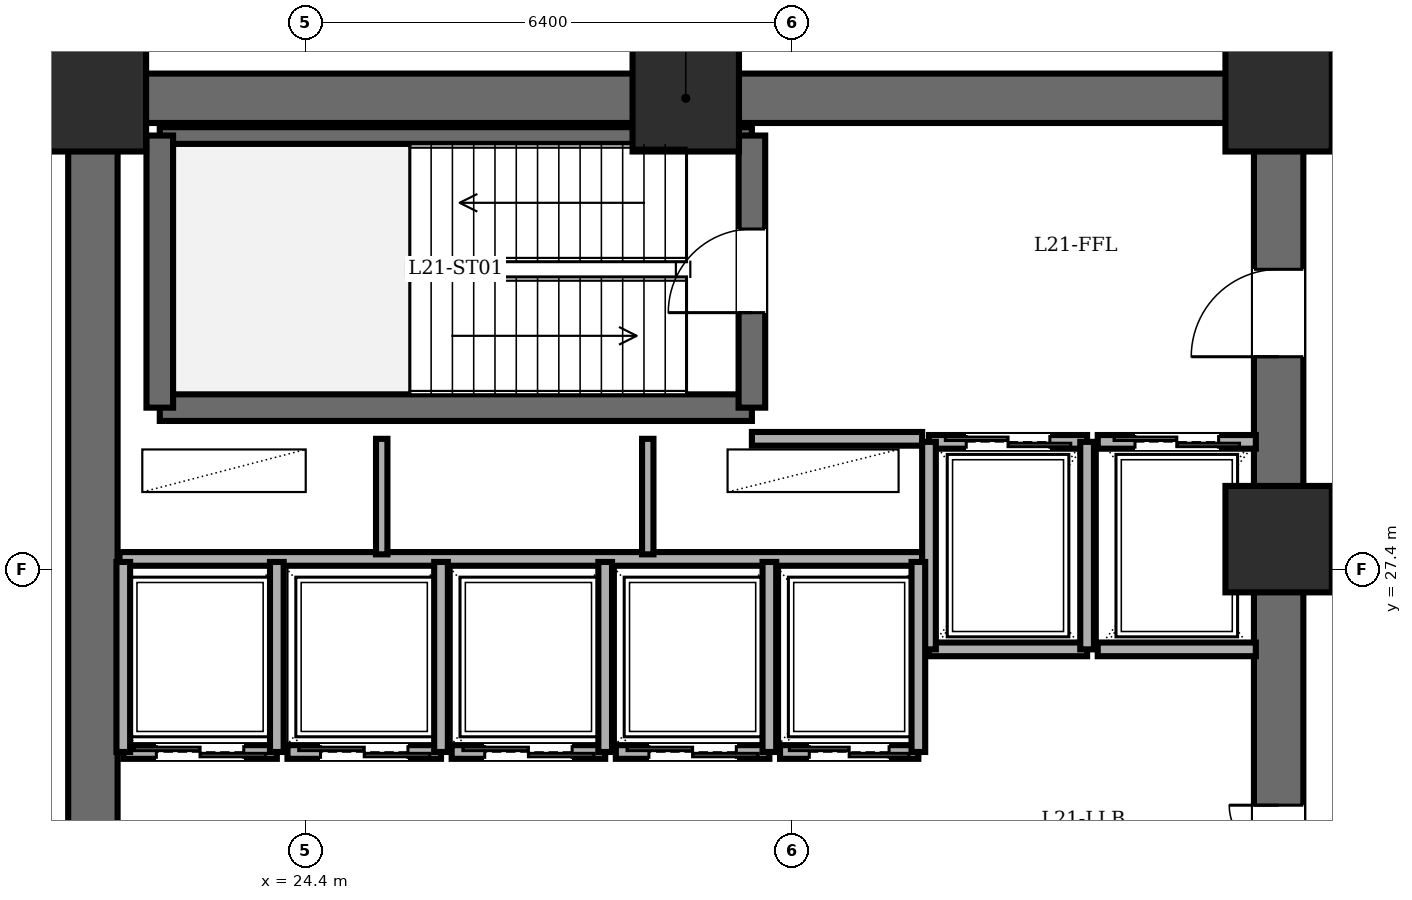
"""IFC4 building model, lengths in metres.
Left out: names, types, materials, properties, quantities, classifications, styles, units other than length and angle.
Written with IfcOpenShell. Run it as: python <this file> out.ifc"""

import sys

from ifc_helpers import new_model, si_unit, direction, frame, frame_2d, origin, origin_2d, place, context, subcontext, project, spatial, rectangle, extrude, element, fill, save


model = new_model("IFC4")
c1 = context("Model", 3, precision=1e-05, world=origin(), true_north=direction((0.0, 1.0)))
c2 = subcontext(c1, "Body", "Model", "MODEL_VIEW")
j1 = project(units=[si_unit("LENGTHUNIT", "METRE"), si_unit("PLANEANGLEUNIT", "RADIAN")], contexts=[c1])
p1 = place(None, origin())
s1 = spatial("IfcSite", under=j1, at=p1, CompositionType="ELEMENT")
p2 = place(p1, origin())
s2 = spatial("IfcBuilding", under=s1, at=p2, CompositionType="ELEMENT")
p3 = place(p2, frame((0.0, 0.0, 81.2)))
s3 = spatial("IfcBuildingStorey", under=s2, at=p3, CompositionType="ELEMENT", Elevation=81.2)
for number, where, z_axis, x_axis in (
    (1, (37.2, 27.8, 0.0), (0.0, 0.0, 1.0), (1.0, 0.0, 0.0)),
    (2, (37.2, 33.6, 0.0), (0.0, 0.0, 1.0), (1.0, 0.0, 0.0)),
    (3, (29.4, 33.6, 0.0), (0.0, 0.0, 1.0), (1.0, 0.0, 0.0)),
    (4, (21.6, 33.6, 0.0), (0.0, 0.0, 1.0), (1.0, 0.0, 0.0)),
):
    element("IfcColumn", number, at=place(p3, frame(where, z_axis=z_axis, x_axis=x_axis)), inside=s3, PredefinedType="COLUMN", context=c2, shape_type="SweptSolid", body=[
        extrude(rectangle(XDim=1.4, YDim=1.4, at=origin_2d()), origin(), (0.0, 0.0, 1.0), 5.1),
    ])
p4 = place(p3, frame((21.6, 14.4, 0.0), z_axis=(0.0, 0.0, 1.0), x_axis=(0.0, 1.0, 0.0)))
e5 = element("IfcWall", 5, at=p4, inside=s3, PredefinedType="SHEAR", context=c2, shape_type="SweptSolid", body=[
    extrude(rectangle(XDim=19.2, YDim=0.65, at=frame_2d((9.6, 0.0))), origin(), (0.0, 0.0, 1.0), 4.9),
])
p5 = place(p3, frame((21.6, 33.6, 0.0), z_axis=(0.0, 0.0, 1.0), x_axis=(1.0, 0.0, 0.0)))
e6 = element("IfcWall", 6, at=p5, inside=s3, PredefinedType="SHEAR", context=c2, shape_type="SweptSolid", body=[
    extrude(rectangle(XDim=15.6, YDim=0.65, at=frame_2d((7.8, 0.0))), origin(), (0.0, 0.0, 1.0), 4.9),
])
p6 = place(p3, frame((37.2, 14.4, 0.0), z_axis=(0.0, 0.0, 1.0), x_axis=(0.0, 1.0, 0.0)))
e7 = element("IfcWall", 7, at=p6, inside=s3, PredefinedType="SHEAR", context=c2, shape_type="SweptSolid", body=[
    extrude(rectangle(XDim=19.2, YDim=0.65, at=frame_2d((9.6, 0.0))), origin(), (0.0, 0.0, 1.0), 4.9),
])
p7 = place(p6, frame((15.8, 0.0, 0.0)))
e8 = element("IfcOpeningElement", 8, at=p7, cuts=e7, PredefinedType="OPENING", context=c2, shape_type="SweptSolid", body=[
    extrude(rectangle(XDim=1.15, YDim=2.15, at=frame_2d((0.575, 1.075))), frame((0.0, 0.335, 0.0), z_axis=(0.0, -1.0, 0.0), x_axis=(1.0, 0.0, 0.0)), (0.0, 0.0, 1.0), 0.67),
])
p8 = place(p6, frame((3.6, 0.0, 0.0)))
e9 = element("IfcOpeningElement", 9, at=p8, cuts=e7, PredefinedType="OPENING", context=c2, shape_type="SweptSolid", body=[
    extrude(rectangle(XDim=1.1, YDim=2.15, at=frame_2d((0.55, 1.075))), frame((0.0, 0.335, 0.0), z_axis=(0.0, -1.0, 0.0), x_axis=(1.0, 0.0, 0.0)), (0.0, 0.0, 1.0), 0.67),
])
p9 = place(p6, frame((8.6, 0.0, 0.0)))
e10 = element("IfcOpeningElement", 10, at=p9, cuts=e7, PredefinedType="OPENING", context=c2, shape_type="SweptSolid", body=[
    extrude(rectangle(XDim=1.3, YDim=2.2, at=frame_2d((0.65, 1.1))), frame((0.0, 0.335, 0.0), z_axis=(0.0, -1.0, 0.0), x_axis=(1.0, 0.0, 0.0)), (0.0, 0.0, 1.0), 0.67),
])
p10 = place(p3, frame((22.48, 29.53, 0.0), z_axis=(0.0, 0.0, 1.0), x_axis=(1.0, 0.0, 0.0)))
e11 = element("IfcWall", 11, at=p10, inside=s3, PredefinedType="SOLIDWALL", context=c2, shape_type="SweptSolid", body=[
    extrude(rectangle(XDim=7.79, YDim=0.35, at=frame_2d((3.895, 0.0))), origin(), (0.0, 0.0, 1.0), 4.9),
])
p11 = place(p3, frame((22.48, 33.11, 0.0), z_axis=(0.0, 0.0, 1.0), x_axis=(1.0, 0.0, 0.0)))
e12 = element("IfcWall", 12, at=p11, inside=s3, PredefinedType="PARTITIONING", context=c2, shape_type="SweptSolid", body=[
    extrude(rectangle(XDim=7.79, YDim=0.22, at=frame_2d((3.895, 0.0))), origin(), (0.0, 0.0, 1.0), 4.9),
])
p12 = place(p3, frame((22.48, 29.53, 0.0), z_axis=(0.0, 0.0, 1.0), x_axis=(0.0, 1.0, 0.0)))
e13 = element("IfcWall", 13, at=p12, inside=s3, PredefinedType="SOLIDWALL", context=c2, shape_type="SweptSolid", body=[
    extrude(rectangle(XDim=3.58, YDim=0.35, at=frame_2d((1.79, 0.0))), origin(), (0.0, 0.0, 1.0), 4.9),
])
p13 = place(p3, frame((30.27, 29.53, 0.0), z_axis=(0.0, 0.0, 1.0), x_axis=(0.0, 1.0, 0.0)))
e14 = element("IfcWall", 14, at=p13, inside=s3, PredefinedType="SOLIDWALL", context=c2, shape_type="SweptSolid", body=[
    extrude(rectangle(XDim=3.58, YDim=0.35, at=frame_2d((1.79, 0.0))), origin(), (0.0, 0.0, 1.0), 4.9),
])
p14 = place(p13, frame((1.25, 0.0, 0.0)))
e15 = element("IfcOpeningElement", 15, at=p14, cuts=e14, PredefinedType="OPENING", context=c2, shape_type="SweptSolid", body=[
    extrude(rectangle(XDim=1.1, YDim=2.15, at=frame_2d((0.55, 1.075))), frame((0.0, 0.185, 0.0), z_axis=(0.0, -1.0, 0.0), x_axis=(1.0, 0.0, 0.0)), (0.0, 0.0, 1.0), 0.37),
])
p15 = place(p3, frame((30.27, 29.12, 0.0), z_axis=(0.0, 0.0, 1.0), x_axis=(1.0, 0.0, 0.0)))
e16 = element("IfcWall", 16, at=p15, inside=s3, PredefinedType="PARTITIONING", context=c2, shape_type="SweptSolid", body=[
    extrude(rectangle(XDim=2.24, YDim=0.18, at=frame_2d((1.12, 0.0))), origin(), (0.0, 0.0, 1.0), 4.9),
])
p16 = place(p3, frame((21.95, 27.54, 0.0), z_axis=(0.0, 0.0, 1.0), x_axis=(1.0, 0.0, 0.0)))
e17 = element("IfcWall", 17, at=p16, inside=s3, PredefinedType="PARTITIONING", context=c2, shape_type="SweptSolid", body=[
    extrude(rectangle(XDim=10.56, YDim=0.18, at=frame_2d((5.28, 0.0))), origin(), (0.0, 0.0, 1.0), 4.9),
])
for number, where, z_axis, x_axis in (
    (18, (25.4, 27.6, 0.0), (0.0, 0.0, 1.0), (0.0, 1.0, 0.0)),
    (19, (28.9, 27.6, 0.0), (0.0, 0.0, 1.0), (0.0, 1.0, 0.0)),
):
    element("IfcWall", number, at=place(p3, frame(where, z_axis=z_axis, x_axis=x_axis)), inside=s3, PredefinedType="PARTITIONING", context=c2, shape_type="SweptSolid", body=[
        extrude(rectangle(XDim=1.52, YDim=0.15, at=frame_2d((0.76, 0.0))), origin(), (0.0, 0.0, 1.0), 4.9),
    ])
p17 = place(p3, frame((32.6, 29.08, 0.0), z_axis=(0.0, 0.0, 1.0), x_axis=(1.0, 0.0, 0.0)))
e20 = element("IfcWall", 20, at=p17, inside=s3, PredefinedType="PARTITIONING", context=c2, shape_type="SweptSolid", body=[
    extrude(rectangle(XDim=2.08, YDim=0.18, at=frame_2d((1.04, 0.0))), origin(), (0.0, 0.0, 1.0), 4.9),
])
p18 = place(p17, frame((0.49, 0.0, 0.0)))
e21 = element("IfcOpeningElement", 21, at=p18, cuts=e20, PredefinedType="OPENING", context=c2, shape_type="SweptSolid", body=[
    extrude(rectangle(XDim=1.1, YDim=2.2, at=frame_2d((0.55, 1.1))), frame((0.0, 0.1, 0.0), z_axis=(0.0, -1.0, 0.0), x_axis=(1.0, 0.0, 0.0)), (0.0, 0.0, 1.0), 0.2),
])
p19 = place(p3, frame((34.68, 26.35, 0.0), z_axis=(0.0, 0.0, 1.0), x_axis=(-1.0, 0.0, 0.0)))
e22 = element("IfcWall", 22, at=p19, inside=s3, PredefinedType="PARTITIONING", context=c2, shape_type="SweptSolid", body=[
    extrude(rectangle(XDim=2.08, YDim=0.18, at=frame_2d((1.04, 0.0))), origin(), (0.0, 0.0, 1.0), 4.9),
])
for number, where, z_axis, x_axis in (
    (23, (34.68, 26.35, 0.0), (0.0, 0.0, 1.0), (0.0, 1.0, 0.0)),
    (24, (32.6, 29.08, 0.0), (0.0, 0.0, 1.0), (0.0, -1.0, 0.0)),
):
    element("IfcWall", number, at=place(p3, frame(where, z_axis=z_axis, x_axis=x_axis)), inside=s3, PredefinedType="PARTITIONING", context=c2, shape_type="SweptSolid", body=[
        extrude(rectangle(XDim=2.73, YDim=0.18, at=frame_2d((1.365, 0.0))), origin(), (0.0, 0.0, 1.0), 4.9),
    ])
p20 = place(p3, frame((34.82, 29.08, 0.0), z_axis=(0.0, 0.0, 1.0), x_axis=(1.0, 0.0, 0.0)))
e25 = element("IfcWall", 25, at=p20, inside=s3, PredefinedType="PARTITIONING", context=c2, shape_type="SweptSolid", body=[
    extrude(rectangle(XDim=2.08, YDim=0.18, at=frame_2d((1.04, 0.0))), origin(), (0.0, 0.0, 1.0), 4.9),
])
p21 = place(p20, frame((0.49, 0.0, 0.0)))
e26 = element("IfcOpeningElement", 26, at=p21, cuts=e25, PredefinedType="OPENING", context=c2, shape_type="SweptSolid", body=[
    extrude(rectangle(XDim=1.1, YDim=2.2, at=frame_2d((0.55, 1.1))), frame((0.0, 0.1, 0.0), z_axis=(0.0, -1.0, 0.0), x_axis=(1.0, 0.0, 0.0)), (0.0, 0.0, 1.0), 0.2),
])
p22 = place(p3, frame((36.9, 26.35, 0.0), z_axis=(0.0, 0.0, 1.0), x_axis=(-1.0, 0.0, 0.0)))
e27 = element("IfcWall", 27, at=p22, inside=s3, PredefinedType="PARTITIONING", context=c2, shape_type="SweptSolid", body=[
    extrude(rectangle(XDim=2.08, YDim=0.18, at=frame_2d((1.04, 0.0))), origin(), (0.0, 0.0, 1.0), 4.9),
])
p23 = place(p3, frame((24.02, 25.0, 0.0), z_axis=(0.0, 0.0, 1.0), x_axis=(-1.0, 0.0, 0.0)))
e28 = element("IfcWall", 28, at=p23, inside=s3, PredefinedType="PARTITIONING", context=c2, shape_type="SweptSolid", body=[
    extrude(rectangle(XDim=2.02, YDim=0.18, at=frame_2d((1.01, 0.0))), origin(), (0.0, 0.0, 1.0), 4.9),
])
p24 = place(p23, frame((0.435, 0.0, 0.0)))
e29 = element("IfcOpeningElement", 29, at=p24, cuts=e28, PredefinedType="OPENING", context=c2, shape_type="SweptSolid", body=[
    extrude(rectangle(XDim=1.15, YDim=2.2, at=frame_2d((0.575, 1.1))), frame((0.0, 0.1, 0.0), z_axis=(0.0, -1.0, 0.0), x_axis=(1.0, 0.0, 0.0)), (0.0, 0.0, 1.0), 0.2),
])
for number, where, z_axis, x_axis in (
    (30, (24.02, 25.0, 0.0), (0.0, 0.0, 1.0), (0.0, 1.0, 0.0)),
    (31, (22.0, 27.5, 0.0), (0.0, 0.0, 1.0), (0.0, -1.0, 0.0)),
):
    element("IfcWall", number, at=place(p3, frame(where, z_axis=z_axis, x_axis=x_axis)), inside=s3, PredefinedType="PARTITIONING", context=c2, shape_type="SweptSolid", body=[
        extrude(rectangle(XDim=2.5, YDim=0.18, at=frame_2d((1.25, 0.0))), origin(), (0.0, 0.0, 1.0), 4.9),
    ])
p25 = place(p3, frame((26.18, 25.0, 0.0), z_axis=(0.0, 0.0, 1.0), x_axis=(-1.0, 0.0, 0.0)))
e32 = element("IfcWall", 32, at=p25, inside=s3, PredefinedType="PARTITIONING", context=c2, shape_type="SweptSolid", body=[
    extrude(rectangle(XDim=2.02, YDim=0.18, at=frame_2d((1.01, 0.0))), origin(), (0.0, 0.0, 1.0), 4.9),
])
p26 = place(p25, frame((0.435, 0.0, 0.0)))
e33 = element("IfcOpeningElement", 33, at=p26, cuts=e32, PredefinedType="OPENING", context=c2, shape_type="SweptSolid", body=[
    extrude(rectangle(XDim=1.15, YDim=2.2, at=frame_2d((0.575, 1.1))), frame((0.0, 0.1, 0.0), z_axis=(0.0, -1.0, 0.0), x_axis=(1.0, 0.0, 0.0)), (0.0, 0.0, 1.0), 0.2),
])
p27 = place(p3, frame((26.18, 25.0, 0.0), z_axis=(0.0, 0.0, 1.0), x_axis=(0.0, 1.0, 0.0)))
e34 = element("IfcWall", 34, at=p27, inside=s3, PredefinedType="PARTITIONING", context=c2, shape_type="SweptSolid", body=[
    extrude(rectangle(XDim=2.5, YDim=0.18, at=frame_2d((1.25, 0.0))), origin(), (0.0, 0.0, 1.0), 4.9),
])
p28 = place(p3, frame((28.34, 25.0, 0.0), z_axis=(0.0, 0.0, 1.0), x_axis=(-1.0, 0.0, 0.0)))
e35 = element("IfcWall", 35, at=p28, inside=s3, PredefinedType="PARTITIONING", context=c2, shape_type="SweptSolid", body=[
    extrude(rectangle(XDim=2.02, YDim=0.18, at=frame_2d((1.01, 0.0))), origin(), (0.0, 0.0, 1.0), 4.9),
])
p29 = place(p28, frame((0.435, 0.0, 0.0)))
e36 = element("IfcOpeningElement", 36, at=p29, cuts=e35, PredefinedType="OPENING", context=c2, shape_type="SweptSolid", body=[
    extrude(rectangle(XDim=1.15, YDim=2.2, at=frame_2d((0.575, 1.1))), frame((0.0, 0.1, 0.0), z_axis=(0.0, -1.0, 0.0), x_axis=(1.0, 0.0, 0.0)), (0.0, 0.0, 1.0), 0.2),
])
p30 = place(p3, frame((28.34, 25.0, 0.0), z_axis=(0.0, 0.0, 1.0), x_axis=(0.0, 1.0, 0.0)))
e37 = element("IfcWall", 37, at=p30, inside=s3, PredefinedType="PARTITIONING", context=c2, shape_type="SweptSolid", body=[
    extrude(rectangle(XDim=2.5, YDim=0.18, at=frame_2d((1.25, 0.0))), origin(), (0.0, 0.0, 1.0), 4.9),
])
p31 = place(p3, frame((30.5, 25.0, 0.0), z_axis=(0.0, 0.0, 1.0), x_axis=(-1.0, 0.0, 0.0)))
e38 = element("IfcWall", 38, at=p31, inside=s3, PredefinedType="PARTITIONING", context=c2, shape_type="SweptSolid", body=[
    extrude(rectangle(XDim=2.02, YDim=0.18, at=frame_2d((1.01, 0.0))), origin(), (0.0, 0.0, 1.0), 4.9),
])
p32 = place(p31, frame((0.435, 0.0, 0.0)))
e39 = element("IfcOpeningElement", 39, at=p32, cuts=e38, PredefinedType="OPENING", context=c2, shape_type="SweptSolid", body=[
    extrude(rectangle(XDim=1.15, YDim=2.2, at=frame_2d((0.575, 1.1))), frame((0.0, 0.1, 0.0), z_axis=(0.0, -1.0, 0.0), x_axis=(1.0, 0.0, 0.0)), (0.0, 0.0, 1.0), 0.2),
])
p33 = place(p3, frame((30.5, 25.0, 0.0), z_axis=(0.0, 0.0, 1.0), x_axis=(0.0, 1.0, 0.0)))
e40 = element("IfcWall", 40, at=p33, inside=s3, PredefinedType="PARTITIONING", context=c2, shape_type="SweptSolid", body=[
    extrude(rectangle(XDim=2.5, YDim=0.18, at=frame_2d((1.25, 0.0))), origin(), (0.0, 0.0, 1.0), 4.9),
])
p34 = place(p3, frame((32.46, 25.0, 0.0), z_axis=(0.0, 0.0, 1.0), x_axis=(-1.0, 0.0, 0.0)))
e41 = element("IfcWall", 41, at=p34, inside=s3, PredefinedType="PARTITIONING", context=c2, shape_type="SweptSolid", body=[
    extrude(rectangle(XDim=1.82, YDim=0.18, at=frame_2d((0.91, 0.0))), origin(), (0.0, 0.0, 1.0), 4.9),
])
p35 = place(p34, frame((0.385, 0.0, 0.0)))
e42 = element("IfcOpeningElement", 42, at=p35, cuts=e41, PredefinedType="OPENING", context=c2, shape_type="SweptSolid", body=[
    extrude(rectangle(XDim=1.05, YDim=2.2, at=frame_2d((0.525, 1.1))), frame((0.0, 0.1, 0.0), z_axis=(0.0, -1.0, 0.0), x_axis=(1.0, 0.0, 0.0)), (0.0, 0.0, 1.0), 0.2),
])
p36 = place(p3, frame((32.46, 25.0, 0.0), z_axis=(0.0, 0.0, 1.0), x_axis=(0.0, 1.0, 0.0)))
e43 = element("IfcWall", 43, at=p36, inside=s3, PredefinedType="PARTITIONING", context=c2, shape_type="SweptSolid", body=[
    extrude(rectangle(XDim=2.5, YDim=0.18, at=frame_2d((1.25, 0.0))), origin(), (0.0, 0.0, 1.0), 4.9),
])
p37 = place(p3, frame((8.8, 33.8, 0.0), z_axis=(0.0, 0.0, 1.0), x_axis=(1.0, 0.0, 0.0)))
e44 = element("IfcWall", 44, at=p37, inside=s3, PredefinedType="PARTITIONING", context=c2, shape_type="SweptSolid", body=[
    extrude(rectangle(XDim=12.7, YDim=0.18, at=frame_2d((6.35, 0.0))), origin(), (0.0, 0.0, 1.0), 4.9),
])
p38 = place(p14, origin())
e45 = element("IfcDoor", 45, at=p38, inside=s3, OperationType="SINGLE_SWING_LEFT", PredefinedType="DOOR", context=c2, shape_type="SweptSolid", body=[
    extrude(rectangle(XDim=1.1, YDim=2.15, at=frame_2d((0.55, 1.075))), frame((0.0, 0.025, 0.0), z_axis=(0.0, -1.0, 0.0), x_axis=(1.0, 0.0, 0.0)), (0.0, 0.0, 1.0), 0.05),
])
fill(e15, e45)
p39 = place(p7, origin())
e46 = element("IfcDoor", 46, at=p39, inside=s3, OperationType="SINGLE_SWING_LEFT", PredefinedType="DOOR", context=c2, shape_type="SweptSolid", body=[
    extrude(rectangle(XDim=1.15, YDim=2.15, at=frame_2d((0.575, 1.075))), frame((0.0, 0.025, 0.0), z_axis=(0.0, -1.0, 0.0), x_axis=(1.0, 0.0, 0.0)), (0.0, 0.0, 1.0), 0.05),
])
fill(e8, e46)
p40 = place(p18, origin())
e47 = element("IfcDoor", 47, at=p40, inside=s3, OperationType="DOUBLE_DOOR_SLIDING", PredefinedType="DOOR", context=c2, shape_type="SweptSolid", body=[
    extrude(rectangle(XDim=1.1, YDim=2.2, at=frame_2d((0.55, 1.1))), frame((0.0, 0.025, 0.0), z_axis=(0.0, -1.0, 0.0), x_axis=(1.0, 0.0, 0.0)), (0.0, 0.0, 1.0), 0.05),
])
fill(e21, e47)
p41 = place(p21, origin())
e48 = element("IfcDoor", 48, at=p41, inside=s3, OperationType="DOUBLE_DOOR_SLIDING", PredefinedType="DOOR", context=c2, shape_type="SweptSolid", body=[
    extrude(rectangle(XDim=1.1, YDim=2.2, at=frame_2d((0.55, 1.1))), frame((0.0, 0.025, 0.0), z_axis=(0.0, -1.0, 0.0), x_axis=(1.0, 0.0, 0.0)), (0.0, 0.0, 1.0), 0.05),
])
fill(e26, e48)
p42 = place(p24, origin())
e49 = element("IfcDoor", 49, at=p42, inside=s3, OperationType="DOUBLE_DOOR_SLIDING", PredefinedType="DOOR", context=c2, shape_type="SweptSolid", body=[
    extrude(rectangle(XDim=1.15, YDim=2.2, at=frame_2d((0.575, 1.1))), frame((0.0, 0.025, 0.0), z_axis=(0.0, -1.0, 0.0), x_axis=(1.0, 0.0, 0.0)), (0.0, 0.0, 1.0), 0.05),
])
fill(e29, e49)
p43 = place(p26, origin())
e50 = element("IfcDoor", 50, at=p43, inside=s3, OperationType="DOUBLE_DOOR_SLIDING", PredefinedType="DOOR", context=c2, shape_type="SweptSolid", body=[
    extrude(rectangle(XDim=1.15, YDim=2.2, at=frame_2d((0.575, 1.1))), frame((0.0, 0.025, 0.0), z_axis=(0.0, -1.0, 0.0), x_axis=(1.0, 0.0, 0.0)), (0.0, 0.0, 1.0), 0.05),
])
fill(e33, e50)
p44 = place(p29, origin())
e51 = element("IfcDoor", 51, at=p44, inside=s3, OperationType="DOUBLE_DOOR_SLIDING", PredefinedType="DOOR", context=c2, shape_type="SweptSolid", body=[
    extrude(rectangle(XDim=1.15, YDim=2.2, at=frame_2d((0.575, 1.1))), frame((0.0, 0.025, 0.0), z_axis=(0.0, -1.0, 0.0), x_axis=(1.0, 0.0, 0.0)), (0.0, 0.0, 1.0), 0.05),
])
fill(e36, e51)
p45 = place(p32, origin())
e52 = element("IfcDoor", 52, at=p45, inside=s3, OperationType="DOUBLE_DOOR_SLIDING", PredefinedType="DOOR", context=c2, shape_type="SweptSolid", body=[
    extrude(rectangle(XDim=1.15, YDim=2.2, at=frame_2d((0.575, 1.1))), frame((0.0, 0.025, 0.0), z_axis=(0.0, -1.0, 0.0), x_axis=(1.0, 0.0, 0.0)), (0.0, 0.0, 1.0), 0.05),
])
fill(e39, e52)
p46 = place(p35, origin())
e53 = element("IfcDoor", 53, at=p46, inside=s3, OperationType="DOUBLE_DOOR_SLIDING", PredefinedType="DOOR", context=c2, shape_type="SweptSolid", body=[
    extrude(rectangle(XDim=1.05, YDim=2.2, at=frame_2d((0.525, 1.1))), frame((0.0, 0.025, 0.0), z_axis=(0.0, -1.0, 0.0), x_axis=(1.0, 0.0, 0.0)), (0.0, 0.0, 1.0), 0.05),
])
fill(e42, e53)
p47 = place(p9, origin())
e54 = element("IfcDoor", 54, at=p47, inside=s3, OperationType="DOUBLE_DOOR_SINGLE_SWING", PredefinedType="DOOR", context=c2, shape_type="SweptSolid", body=[
    extrude(rectangle(XDim=1.3, YDim=2.2, at=frame_2d((0.65, 1.1))), frame((0.0, 0.025, 0.0), z_axis=(0.0, -1.0, 0.0), x_axis=(1.0, 0.0, 0.0)), (0.0, 0.0, 1.0), 0.05),
])
fill(e10, e54)
save(model, sys.argv[1])
